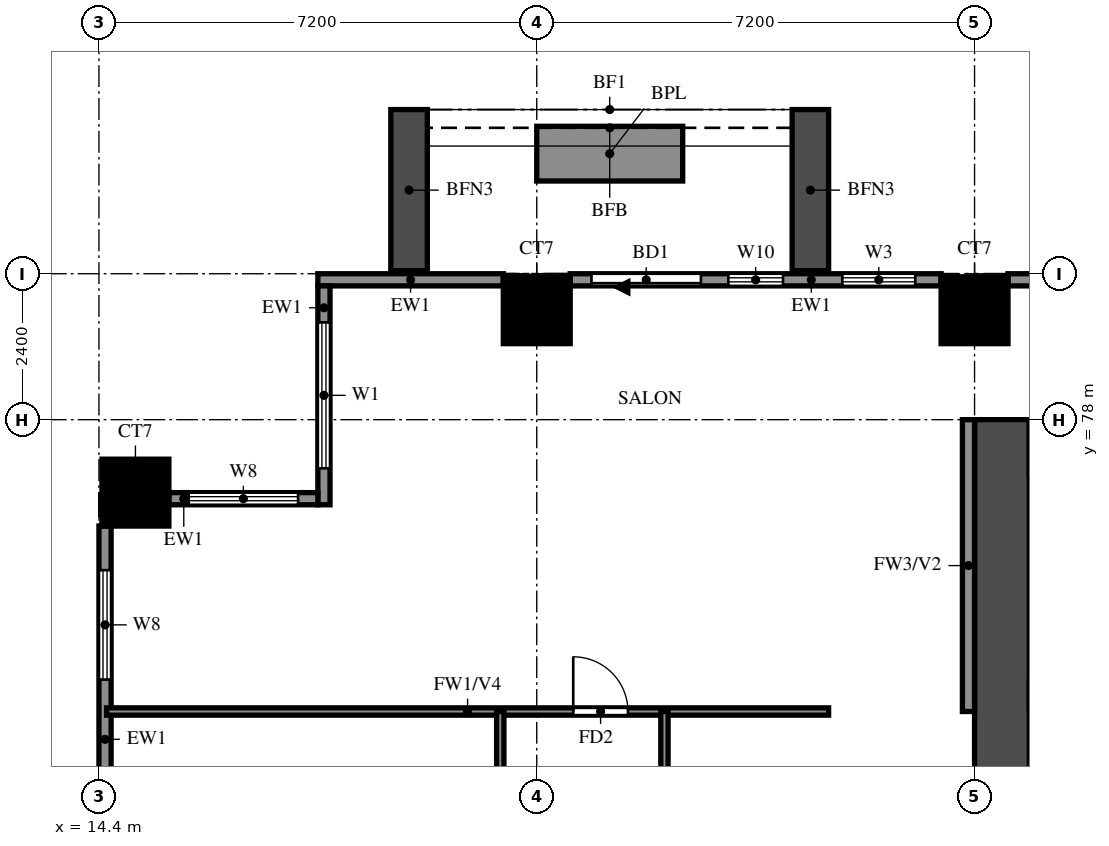
"""IFC4 building model, lengths in metres.
Left out: names, types, materials, properties, quantities, classifications, styles, units other than length and angle.
Written with IfcOpenShell. Run it as: python <this file> out.ifc"""

import sys

from ifc_helpers import new_model, si_unit, direction, frame, frame_2d, origin, origin_2d, place, context, subcontext, project, spatial, rectangle, extrude, source, transform, mapped, element, fill, save


model = new_model("IFC4")
c1 = context("Model", 3, precision=1e-05, world=origin(), true_north=direction((0.0, 1.0)))
c2 = subcontext(c1, "Body", "Model", "MODEL_VIEW")
j1 = project(units=[si_unit("LENGTHUNIT", "METRE"), si_unit("PLANEANGLEUNIT", "RADIAN")], contexts=[c1])
p1 = place(None, origin())
s1 = spatial("IfcSite", under=j1, at=p1, CompositionType="ELEMENT")
p2 = place(p1, origin())
s2 = spatial("IfcBuilding", under=s1, at=p2, CompositionType="ELEMENT")
p3 = place(p2, frame((0.0, 0.0, 37.5)))
s3 = spatial("IfcBuildingStorey", under=s2, at=p3, CompositionType="ELEMENT", Elevation=37.5)
m1 = source(origin(), c2, "Body", "SweptSolid", [
    extrude(rectangle(XDim=1.1, YDim=1.1, at=origin_2d()), origin(), (0.0, 0.0, 1.0), 3.18),
])
for number, where, z_axis, x_axis in (
    (1, (15.0, 76.8, 0.0), (0.0, 0.0, 1.0), (1.0, 0.0, 0.0)),
    (2, (21.6, 79.8, 0.0), (0.0, 0.0, 1.0), (1.0, 0.0, 0.0)),
    (3, (28.8, 79.8, 0.0), (0.0, 0.0, 1.0), (1.0, 0.0, 0.0)),
):
    element("IfcColumn", number, at=place(p3, frame(where, z_axis=z_axis, x_axis=x_axis)), inside=s3, PredefinedType="COLUMN", context=c2, shape_type="MappedRepresentation", body=[
        mapped(m1, transform((0.0, 0.0, 0.0))),
    ])
p4 = place(p3, frame((29.25, 66.0, 0.0), z_axis=(0.0, 0.0, 1.0), x_axis=(0.0, 1.0, 0.0)))
e4 = element("IfcWall", 4, at=p4, inside=s3, PredefinedType="SHEAR", context=c2, shape_type="SweptSolid", body=[
    extrude(rectangle(XDim=12.0, YDim=0.9, at=frame_2d((6.0, 0.0))), origin(), (0.0, 0.0, 1.0), 3.18),
])
p5 = place(p3, frame((29.7, 73.475, 0.0), z_axis=(0.0, 0.0, 1.0), x_axis=(1.0, 0.0, 0.0)))
e5 = element("IfcWall", 5, at=p5, inside=s3, PredefinedType="SHEAR", context=c2, shape_type="SweptSolid", body=[
    extrude(rectangle(XDim=3.175, YDim=0.45, at=frame_2d((1.587, 0.0))), origin(), (0.0, 0.0, 1.0), 3.18),
])
p6 = place(p3, frame((35.45, 80.3, 0.0), z_axis=(0.0, 0.0, 1.0), x_axis=(-1.0, 0.0, 0.0)))
e6 = element("IfcWall", 6, at=p6, inside=s3, PredefinedType="SOLIDWALL", context=c2, shape_type="SweptSolid", body=[
    extrude(rectangle(XDim=6.1, YDim=0.2, at=frame_2d((3.05, 0.0))), origin(), (0.0, 0.0, 1.0), 3.18),
])
p7 = place(p3, frame((28.25, 80.3, 0.0), z_axis=(0.0, 0.0, 1.0), x_axis=(-1.0, 0.0, 0.0)))
e7 = element("IfcWall", 7, at=p7, inside=s3, PredefinedType="SOLIDWALL", context=c2, shape_type="SweptSolid", body=[
    extrude(rectangle(XDim=6.1, YDim=0.2, at=frame_2d((3.05, 0.0))), origin(), (0.0, 0.0, 1.0), 3.18),
])
p8 = place(p7, frame((3.95, 0.0, 0.0)))
e8 = element("IfcOpeningElement", 8, at=p8, cuts=e7, PredefinedType="OPENING", context=c2, shape_type="SweptSolid", body=[
    extrude(rectangle(XDim=1.8, YDim=2.4, at=frame_2d((0.9, 1.2))), frame((0.0, 0.11, 0.0), z_axis=(0.0, -1.0, 0.0), x_axis=(1.0, 0.0, 0.0)), (0.0, 0.0, 1.0), 0.22),
])
p9 = place(p7, frame((0.425, 0.0, 0.6)))
e9 = element("IfcOpeningElement", 9, at=p9, cuts=e7, PredefinedType="OPENING", context=c2, shape_type="SweptSolid", body=[
    extrude(rectangle(XDim=1.2, YDim=2.4, at=frame_2d((0.6, 1.2))), frame((0.0, 0.11, 0.0), z_axis=(0.0, -1.0, 0.0), x_axis=(1.0, 0.0, 0.0)), (0.0, 0.0, 1.0), 0.22),
])
p10 = place(p7, frame((2.6, 0.0, 0.6)))
e10 = element("IfcOpeningElement", 10, at=p10, cuts=e7, PredefinedType="OPENING", context=c2, shape_type="SweptSolid", body=[
    extrude(rectangle(XDim=0.9, YDim=2.4, at=frame_2d((0.45, 1.2))), frame((0.0, 0.11, 0.0), z_axis=(0.0, -1.0, 0.0), x_axis=(1.0, 0.0, 0.0)), (0.0, 0.0, 1.0), 0.22),
])
p11 = place(p3, frame((21.05, 80.3, 0.0), z_axis=(0.0, 0.0, 1.0), x_axis=(-1.0, 0.0, 0.0)))
e11 = element("IfcWall", 11, at=p11, inside=s3, PredefinedType="SOLIDWALL", context=c2, shape_type="SweptSolid", body=[
    extrude(rectangle(XDim=3.05, YDim=0.2, at=frame_2d((1.525, 0.0))), origin(), (0.0, 0.0, 1.0), 3.18),
])
p12 = place(p3, frame((18.1, 80.2, 0.0), z_axis=(0.0, 0.0, 1.0), x_axis=(0.0, -1.0, 0.0)))
e12 = element("IfcWall", 12, at=p12, inside=s3, PredefinedType="SOLIDWALL", context=c2, shape_type="SweptSolid", body=[
    extrude(rectangle(XDim=3.6, YDim=0.2, at=frame_2d((1.8, 0.0))), origin(), (0.0, 0.0, 1.0), 3.18),
])
p13 = place(p12, frame((0.6, 0.0, 0.6)))
e13 = element("IfcOpeningElement", 13, at=p13, cuts=e12, PredefinedType="OPENING", context=c2, shape_type="SweptSolid", body=[
    extrude(rectangle(XDim=2.4, YDim=2.4, at=frame_2d((1.2, 1.2))), frame((0.0, 0.11, 0.0), z_axis=(0.0, -1.0, 0.0), x_axis=(1.0, 0.0, 0.0)), (0.0, 0.0, 1.0), 0.22),
])
p14 = place(p3, frame((18.0, 76.7, 0.0), z_axis=(0.0, 0.0, 1.0), x_axis=(-1.0, 0.0, 0.0)))
e14 = element("IfcWall", 14, at=p14, inside=s3, PredefinedType="SOLIDWALL", context=c2, shape_type="SweptSolid", body=[
    extrude(rectangle(XDim=2.45, YDim=0.2, at=frame_2d((1.225, 0.0))), origin(), (0.0, 0.0, 1.0), 3.18),
])
p15 = place(p14, frame((0.325, 0.0, 0.6)))
e15 = element("IfcOpeningElement", 15, at=p15, cuts=e14, PredefinedType="OPENING", context=c2, shape_type="SweptSolid", body=[
    extrude(rectangle(XDim=1.8, YDim=2.4, at=frame_2d((0.9, 1.2))), frame((0.0, 0.11, 0.0), z_axis=(0.0, -1.0, 0.0), x_axis=(1.0, 0.0, 0.0)), (0.0, 0.0, 1.0), 0.22),
])
p16 = place(p3, frame((14.5, 76.25, 0.0), z_axis=(0.0, 0.0, 1.0), x_axis=(0.0, -1.0, 0.0)))
e16 = element("IfcWall", 16, at=p16, inside=s3, PredefinedType="SOLIDWALL", context=c2, shape_type="SweptSolid", body=[
    extrude(rectangle(XDim=6.1, YDim=0.2, at=frame_2d((3.05, 0.0))), origin(), (0.0, 0.0, 1.0), 3.18),
])
p17 = place(p16, frame((4.025, 0.0, 1.5)))
e17 = element("IfcOpeningElement", 17, at=p17, cuts=e16, PredefinedType="OPENING", context=c2, shape_type="SweptSolid", body=[
    extrude(rectangle(XDim=0.9, YDim=0.9, at=frame_2d((0.45, 0.45))), frame((0.0, 0.11, 0.0), z_axis=(0.0, -1.0, 0.0), x_axis=(1.0, 0.0, 0.0)), (0.0, 0.0, 1.0), 0.22),
])
p18 = place(p16, frame((0.725, 0.0, 0.6)))
e18 = element("IfcOpeningElement", 18, at=p18, cuts=e16, PredefinedType="OPENING", context=c2, shape_type="SweptSolid", body=[
    extrude(rectangle(XDim=1.8, YDim=2.4, at=frame_2d((0.9, 1.2))), frame((0.0, 0.11, 0.0), z_axis=(0.0, -1.0, 0.0), x_axis=(1.0, 0.0, 0.0)), (0.0, 0.0, 1.0), 0.22),
])
for number, where, z_axis, x_axis in (
    (19, (26.1, 80.45, 0.0), (0.0, 0.0, 1.0), (0.0, 1.0, 0.0)),
    (20, (19.5, 80.45, 0.0), (0.0, 0.0, 1.0), (0.0, 1.0, 0.0)),
):
    element("IfcWall", number, at=place(p3, frame(where, z_axis=z_axis, x_axis=x_axis)), inside=s3, PredefinedType="SOLIDWALL", context=c2, shape_type="SweptSolid", body=[
        extrude(rectangle(XDim=2.65, YDim=0.6, at=frame_2d((1.325, 0.0))), origin(), (0.0, 0.0, 1.0), 2.85),
    ])
p19 = place(p3, frame((24.0, 82.375, 0.0), z_axis=(0.0, 0.0, 1.0), x_axis=(-1.0, 0.0, 0.0)))
e21 = element("IfcWall", 21, at=p19, inside=s3, PredefinedType="SOLIDWALL", context=c2, shape_type="SweptSolid", body=[
    extrude(rectangle(XDim=2.4, YDim=0.9, at=frame_2d((1.2, 0.0))), origin(), (0.0, 0.0, 1.0), 0.9),
])
p20 = place(p3, frame((28.7, 73.2, 0.0), z_axis=(0.0, 0.0, 1.0), x_axis=(0.0, 1.0, 0.0)))
e22 = element("IfcWall", 22, at=p20, inside=s3, PredefinedType="SOLIDWALL", context=c2, shape_type="SweptSolid", body=[
    extrude(rectangle(XDim=4.8, YDim=0.2, at=frame_2d((2.4, 0.0))), origin(), (0.0, 0.0, 1.0), 3.18),
])
p21 = place(p3, frame((14.525, 73.2, 0.0), z_axis=(0.0, 0.0, 1.0), x_axis=(1.0, 0.0, 0.0)))
e23 = element("IfcWall", 23, at=p21, inside=s3, PredefinedType="PARTITIONING", context=c2, shape_type="SweptSolid", body=[
    extrude(rectangle(XDim=11.875, YDim=0.12, at=frame_2d((5.938, 0.0))), origin(), (0.0, 0.0, 1.0), 2.28),
])
p22 = place(p21, frame((7.675, 0.0, 0.0)))
e24 = element("IfcOpeningElement", 24, at=p22, cuts=e23, PredefinedType="OPENING", context=c2, shape_type="SweptSolid", body=[
    extrude(rectangle(XDim=0.9, YDim=2.1, at=frame_2d((0.45, 1.05))), frame((0.0, 0.07, 0.0), z_axis=(0.0, -1.0, 0.0), x_axis=(1.0, 0.0, 0.0)), (0.0, 0.0, 1.0), 0.14),
])
p23 = place(p3, frame((21.0, 69.6, 0.0), z_axis=(0.0, 0.0, 1.0), x_axis=(0.0, 1.0, 0.0)))
e25 = element("IfcWall", 25, at=p23, inside=s3, PredefinedType="PARTITIONING", context=c2, shape_type="SweptSolid", body=[
    extrude(rectangle(XDim=3.6, YDim=0.12, at=frame_2d((1.8, 0.0))), origin(), (0.0, 0.0, 1.0), 3.18),
])
p24 = place(p3, frame((23.7, 64.8, 0.0), z_axis=(0.0, 0.0, 1.0), x_axis=(0.0, 1.0, 0.0)))
e26 = element("IfcWall", 26, at=p24, inside=s3, PredefinedType="PARTITIONING", context=c2, shape_type="SweptSolid", body=[
    extrude(rectangle(XDim=8.4, YDim=0.12, at=frame_2d((4.2, 0.0))), origin(), (0.0, 0.0, 1.0), 3.18),
])
p25 = place(p24, frame((4.875, 0.0, 0.0)))
e27 = element("IfcOpeningElement", 27, at=p25, cuts=e26, PredefinedType="OPENING", context=c2, shape_type="SweptSolid", body=[
    extrude(rectangle(XDim=0.9, YDim=2.1, at=frame_2d((0.45, 1.05))), frame((0.0, 0.07, 0.0), z_axis=(0.0, -1.0, 0.0), x_axis=(1.0, 0.0, 0.0)), (0.0, 0.0, 1.0), 0.14),
])
p26 = place(p8, origin())
e28 = element("IfcDoor", 28, at=p26, inside=s3, OperationType="DOUBLE_DOOR_SLIDING", PredefinedType="DOOR", context=c2, shape_type="SweptSolid", body=[
    extrude(rectangle(XDim=1.8, YDim=2.4, at=frame_2d((0.9, 1.2))), frame((0.0, 0.025, 0.0), z_axis=(0.0, -1.0, 0.0), x_axis=(1.0, 0.0, 0.0)), (0.0, 0.0, 1.0), 0.05),
])
fill(e8, e28)
p27 = place(p9, origin())
e29 = element("IfcWindow", 29, at=p27, inside=s3, PartitioningType="SINGLE_PANEL", PredefinedType="WINDOW", context=c2, shape_type="SweptSolid", body=[
    extrude(rectangle(XDim=1.2, YDim=2.4, at=frame_2d((0.6, 1.2))), frame((0.0, 0.03, 0.0), z_axis=(0.0, -1.0, 0.0), x_axis=(1.0, 0.0, 0.0)), (0.0, 0.0, 1.0), 0.06),
])
fill(e9, e29)
p28 = place(p10, origin())
e30 = element("IfcWindow", 30, at=p28, inside=s3, PartitioningType="SINGLE_PANEL", PredefinedType="WINDOW", context=c2, shape_type="SweptSolid", body=[
    extrude(rectangle(XDim=0.9, YDim=2.4, at=frame_2d((0.45, 1.2))), frame((0.0, 0.03, 0.0), z_axis=(0.0, -1.0, 0.0), x_axis=(1.0, 0.0, 0.0)), (0.0, 0.0, 1.0), 0.06),
])
fill(e10, e30)
p29 = place(p13, origin())
e31 = element("IfcWindow", 31, at=p29, inside=s3, PartitioningType="DOUBLE_PANEL_VERTICAL", PredefinedType="WINDOW", context=c2, shape_type="SweptSolid", body=[
    extrude(rectangle(XDim=2.4, YDim=2.4, at=frame_2d((1.2, 1.2))), frame((0.0, 0.03, 0.0), z_axis=(0.0, -1.0, 0.0), x_axis=(1.0, 0.0, 0.0)), (0.0, 0.0, 1.0), 0.06),
])
fill(e13, e31)
p30 = place(p15, origin())
e32 = element("IfcWindow", 32, at=p30, inside=s3, PartitioningType="DOUBLE_PANEL_VERTICAL", PredefinedType="WINDOW", context=c2, shape_type="SweptSolid", body=[
    extrude(rectangle(XDim=1.8, YDim=2.4, at=frame_2d((0.9, 1.2))), frame((0.0, 0.03, 0.0), z_axis=(0.0, -1.0, 0.0), x_axis=(1.0, 0.0, 0.0)), (0.0, 0.0, 1.0), 0.06),
])
fill(e15, e32)
p31 = place(p18, origin())
e33 = element("IfcWindow", 33, at=p31, inside=s3, PartitioningType="DOUBLE_PANEL_VERTICAL", PredefinedType="WINDOW", context=c2, shape_type="SweptSolid", body=[
    extrude(rectangle(XDim=1.8, YDim=2.4, at=frame_2d((0.9, 1.2))), frame((0.0, 0.03, 0.0), z_axis=(0.0, -1.0, 0.0), x_axis=(1.0, 0.0, 0.0)), (0.0, 0.0, 1.0), 0.06),
])
fill(e18, e33)
p32 = place(p22, origin())
e34 = element("IfcDoor", 34, at=p32, inside=s3, OperationType="SINGLE_SWING_RIGHT", PredefinedType="DOOR", context=c2, shape_type="SweptSolid", body=[
    extrude(rectangle(XDim=0.9, YDim=2.1, at=frame_2d((0.45, 1.05))), frame((0.0, 0.025, 0.0), z_axis=(0.0, -1.0, 0.0), x_axis=(1.0, 0.0, 0.0)), (0.0, 0.0, 1.0), 0.05),
])
fill(e24, e34)
save(model, sys.argv[1])
